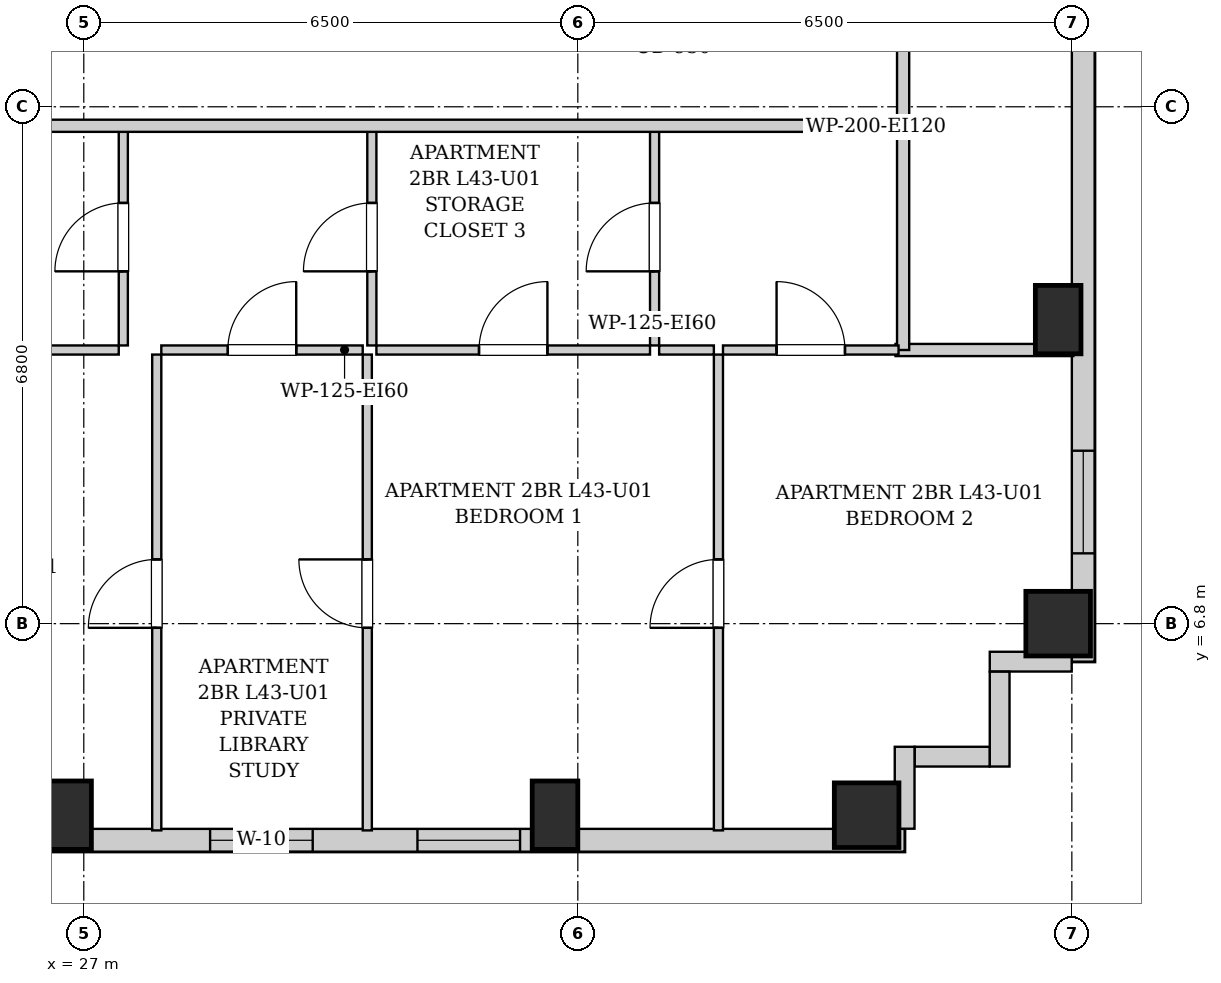
"""IFC4 building model, lengths in metres.
Left out: names, types, materials, properties, quantities, classifications, styles, units other than length and angle.
Written with IfcOpenShell. Run it as: python <this file> out.ifc"""

import sys

from ifc_helpers import new_model, si_unit, direction, frame, frame_2d, origin, origin_2d, place, context, subcontext, project, spatial, rectangle, extrude, element, fill, save


model = new_model("IFC4")
c1 = context("Model", 3, precision=1e-05, world=origin(), true_north=direction((0.0, 1.0)))
c2 = subcontext(c1, "Body", "Model", "MODEL_VIEW")
j1 = project(units=[si_unit("LENGTHUNIT", "METRE"), si_unit("PLANEANGLEUNIT", "RADIAN")], contexts=[c1])
p1 = place(None, origin())
s1 = spatial("IfcSite", under=j1, at=p1, CompositionType="ELEMENT")
p2 = place(p1, origin())
s2 = spatial("IfcBuilding", under=s1, at=p2, CompositionType="ELEMENT")
p3 = place(p2, frame((0.0, 0.0, 150.4)))
s3 = spatial("IfcBuildingStorey", under=s2, at=p3, CompositionType="ELEMENT", Elevation=150.4)
for number, where, z_axis, x_axis in (
    (1, (26.8, 4.28, 0.0), (0.0, 0.0, 1.0), (1.0, 0.0, 0.0)),
    (2, (33.2, 4.28, 0.0), (0.0, 0.0, 1.0), (1.0, 0.0, 0.0)),
):
    element("IfcColumn", number, at=place(p3, frame(where, z_axis=z_axis, x_axis=x_axis)), inside=s3, PredefinedType="COLUMN", context=c2, shape_type="SweptSolid", body=[
        extrude(rectangle(XDim=0.6, YDim=0.9, at=origin_2d()), origin(), (0.0, 0.0, 1.0), 3.25),
    ])
for number, where, z_axis, x_axis in (
    (3, (37.3, 4.28, 0.0), (0.0, 0.0, 1.0), (1.0, 0.0, 0.0)),
    (4, (39.82, 6.8, 0.0), (0.0, 0.0, 1.0), (1.0, 0.0, 0.0)),
):
    element("IfcColumn", number, at=place(p3, frame(where, z_axis=z_axis, x_axis=x_axis)), inside=s3, PredefinedType="COLUMN", context=c2, shape_type="SweptSolid", body=[
        extrude(rectangle(XDim=0.85, YDim=0.85, at=origin_2d()), origin(), (0.0, 0.0, 1.0), 3.25),
    ])
p4 = place(p3, frame((39.82, 10.8, 0.0), z_axis=(0.0, 0.0, 1.0), x_axis=(1.0, 0.0, 0.0)))
e5 = element("IfcColumn", 5, at=p4, inside=s3, PredefinedType="COLUMN", context=c2, shape_type="SweptSolid", body=[
    extrude(rectangle(XDim=0.6, YDim=0.9, at=origin_2d()), origin(), (0.0, 0.0, 1.0), 3.25),
])
p5 = place(p3, frame((40.15, 40.8, 0.0), z_axis=(0.0, 0.0, 1.0), x_axis=(0.0, -1.0, 0.0)))
e6 = element("IfcWall", 6, at=p5, inside=s3, PredefinedType="SOLIDWALL", context=c2, shape_type="SweptSolid", body=[
    extrude(rectangle(XDim=34.5, YDim=0.3, at=frame_2d((17.25, 0.0))), origin(), (0.0, 0.0, 1.0), 2.99),
])
p6 = place(p5, frame((31.725, 0.0, 0.55)))
e7 = element("IfcOpeningElement", 7, at=p6, cuts=e6, PredefinedType="OPENING", context=c2, shape_type="SweptSolid", body=[
    extrude(rectangle(XDim=1.35, YDim=1.2, at=frame_2d((0.675, 0.6))), frame((0.0, 0.16, 0.0), z_axis=(0.0, -1.0, 0.0), x_axis=(1.0, 0.0, 0.0)), (0.0, 0.0, 1.0), 0.32),
])
p7 = place(p5, frame((22.8, 0.0, 0.55)))
e8 = element("IfcOpeningElement", 8, at=p7, cuts=e6, PredefinedType="OPENING", context=c2, shape_type="SweptSolid", body=[
    extrude(rectangle(XDim=1.35, YDim=1.2, at=frame_2d((0.675, 0.6))), frame((0.0, 0.16, 0.0), z_axis=(0.0, -1.0, 0.0), x_axis=(1.0, 0.0, 0.0)), (0.0, 0.0, 1.0), 0.32),
])
p8 = place(p5, frame((13.425, 0.0, 0.55)))
e9 = element("IfcOpeningElement", 9, at=p8, cuts=e6, PredefinedType="OPENING", context=c2, shape_type="SweptSolid", body=[
    extrude(rectangle(XDim=1.35, YDim=1.2, at=frame_2d((0.675, 0.6))), frame((0.0, 0.16, 0.0), z_axis=(0.0, -1.0, 0.0), x_axis=(1.0, 0.0, 0.0)), (0.0, 0.0, 1.0), 0.32),
])
p9 = place(p3, frame((37.8, 3.95, 0.0), z_axis=(0.0, 0.0, 1.0), x_axis=(-1.0, 0.0, 0.0)))
e10 = element("IfcWall", 10, at=p9, inside=s3, PredefinedType="SOLIDWALL", context=c2, shape_type="SweptSolid", body=[
    extrude(rectangle(XDim=19.95, YDim=0.3, at=frame_2d((9.975, 0.0))), origin(), (0.0, 0.0, 1.0), 2.99),
])
p10 = place(p9, frame((16.555, 0.0, 0.55)))
e11 = element("IfcOpeningElement", 11, at=p10, cuts=e10, PredefinedType="OPENING", context=c2, shape_type="SweptSolid", body=[
    extrude(rectangle(XDim=1.35, YDim=1.2, at=frame_2d((0.675, 0.6))), frame((0.0, 0.16, 0.0), z_axis=(0.0, -1.0, 0.0), x_axis=(1.0, 0.0, 0.0)), (0.0, 0.0, 1.0), 0.32),
])
p11 = place(p9, frame((7.788, 0.0, 0.55)))
e12 = element("IfcOpeningElement", 12, at=p11, cuts=e10, PredefinedType="OPENING", context=c2, shape_type="SweptSolid", body=[
    extrude(rectangle(XDim=1.35, YDim=1.2, at=frame_2d((0.675, 0.6))), frame((0.0, 0.16, 0.0), z_axis=(0.0, -1.0, 0.0), x_axis=(1.0, 0.0, 0.0)), (0.0, 0.0, 1.0), 0.32),
])
p12 = place(p9, frame((5.06, 0.0, 0.55)))
e13 = element("IfcOpeningElement", 13, at=p12, cuts=e10, PredefinedType="OPENING", context=c2, shape_type="SweptSolid", body=[
    extrude(rectangle(XDim=1.35, YDim=1.2, at=frame_2d((0.675, 0.6))), frame((0.0, 0.16, 0.0), z_axis=(0.0, -1.0, 0.0), x_axis=(1.0, 0.0, 0.0)), (0.0, 0.0, 1.0), 0.32),
])
p13 = place(p3, frame((39.998, 6.3, 0.0), z_axis=(0.0, 0.0, 1.0), x_axis=(-1.0, 0.0, 0.0)))
e14 = element("IfcWall", 14, at=p13, inside=s3, PredefinedType="SOLIDWALL", context=c2, shape_type="SweptSolid", body=[
    extrude(rectangle(XDim=1.078, YDim=0.26, at=frame_2d((0.539, 0.0))), origin(), (0.0, 0.0, 1.0), 2.99),
])
p14 = place(p3, frame((39.05, 6.168, 0.0), z_axis=(0.0, 0.0, 1.0), x_axis=(0.0, -1.0, 0.0)))
e15 = element("IfcWall", 15, at=p14, inside=s3, PredefinedType="SOLIDWALL", context=c2, shape_type="SweptSolid", body=[
    extrude(rectangle(XDim=1.248, YDim=0.26, at=frame_2d((0.624, 0.0))), origin(), (0.0, 0.0, 1.0), 2.99),
])
p15 = place(p3, frame((38.918, 5.05, 0.0), z_axis=(0.0, 0.0, 1.0), x_axis=(-1.0, 0.0, 0.0)))
e16 = element("IfcWall", 16, at=p15, inside=s3, PredefinedType="SOLIDWALL", context=c2, shape_type="SweptSolid", body=[
    extrude(rectangle(XDim=0.986, YDim=0.26, at=frame_2d((0.493, 0.0))), origin(), (0.0, 0.0, 1.0), 2.99),
])
p16 = place(p3, frame((37.8, 5.18, 0.0), z_axis=(0.0, 0.0, 1.0), x_axis=(0.0, -1.0, 0.0)))
e17 = element("IfcWall", 17, at=p16, inside=s3, PredefinedType="SOLIDWALL", context=c2, shape_type="SweptSolid", body=[
    extrude(rectangle(XDim=1.078, YDim=0.26, at=frame_2d((0.539, 0.0))), origin(), (0.0, 0.0, 1.0), 2.99),
])
p17 = place(p3, frame((37.78, 13.35, 0.0), z_axis=(0.0, 0.0, 1.0), x_axis=(0.0, 1.0, 0.0)))
e18 = element("IfcWall", 18, at=p17, inside=s3, PredefinedType="PARTITIONING", context=c2, shape_type="SweptSolid", body=[
    extrude(rectangle(XDim=1.74, YDim=0.16, at=frame_2d((0.87, 0.0))), origin(), (0.0, 0.0, 1.0), 2.99),
])
p18 = place(p3, frame((37.68, 10.4, 0.0), z_axis=(0.0, 0.0, 1.0), x_axis=(1.0, 0.0, 0.0)))
e19 = element("IfcWall", 19, at=p18, inside=s3, PredefinedType="PARTITIONING", context=c2, shape_type="SweptSolid", body=[
    extrude(rectangle(XDim=2.34, YDim=0.16, at=frame_2d((1.17, 0.0))), origin(), (0.0, 0.0, 1.0), 2.99),
])
p19 = place(p3, frame((37.78, 10.4, 0.0), z_axis=(0.0, 0.0, 1.0), x_axis=(0.0, 1.0, 0.0)))
e20 = element("IfcWall", 20, at=p19, inside=s3, PredefinedType="PARTITIONING", context=c2, shape_type="SweptSolid", body=[
    extrude(rectangle(XDim=2.91, YDim=0.16, at=frame_2d((1.455, 0.0))), origin(), (0.0, 0.0, 1.0), 2.99),
])
p20 = place(p3, frame((27.52, 10.46, 0.0), z_axis=(0.0, 0.0, 1.0), x_axis=(0.0, 1.0, 0.0)))
e21 = element("IfcWall", 21, at=p20, inside=s3, PredefinedType="PARTITIONING", context=c2, shape_type="SweptSolid", body=[
    extrude(rectangle(XDim=2.85, YDim=0.12, at=frame_2d((1.425, 0.0))), origin(), (0.0, 0.0, 1.0), 2.99),
])
p21 = place(p20, frame((0.975, 0.0, 0.0)))
e22 = element("IfcOpeningElement", 22, at=p21, cuts=e21, PredefinedType="OPENING", context=c2, shape_type="SweptSolid", body=[
    extrude(rectangle(XDim=0.9, YDim=2.05, at=frame_2d((0.45, 1.025))), frame((0.0, 0.07, 0.0), z_axis=(0.0, -1.0, 0.0), x_axis=(1.0, 0.0, 0.0)), (0.0, 0.0, 1.0), 0.14),
])
p22 = place(p3, frame((23.86, 10.4, 0.0), z_axis=(0.0, 0.0, 1.0), x_axis=(1.0, 0.0, 0.0)))
e23 = element("IfcWall", 23, at=p22, inside=s3, PredefinedType="PARTITIONING", context=c2, shape_type="SweptSolid", body=[
    extrude(rectangle(XDim=3.6, YDim=0.12, at=frame_2d((1.8, 0.0))), origin(), (0.0, 0.0, 1.0), 2.99),
])
p23 = place(p22, frame((1.35, 0.0, 0.0)))
e24 = element("IfcOpeningElement", 24, at=p23, cuts=e23, PredefinedType="OPENING", context=c2, shape_type="SweptSolid", body=[
    extrude(rectangle(XDim=0.9, YDim=2.05, at=frame_2d((0.45, 1.025))), frame((0.0, 0.07, 0.0), z_axis=(0.0, -1.0, 0.0), x_axis=(1.0, 0.0, 0.0)), (0.0, 0.0, 1.0), 0.14),
])
p24 = place(p3, frame((30.79, 10.46, 0.0), z_axis=(0.0, 0.0, 1.0), x_axis=(0.0, 1.0, 0.0)))
e25 = element("IfcWall", 25, at=p24, inside=s3, PredefinedType="PARTITIONING", context=c2, shape_type="SweptSolid", body=[
    extrude(rectangle(XDim=2.85, YDim=0.12, at=frame_2d((1.425, 0.0))), origin(), (0.0, 0.0, 1.0), 2.99),
])
p25 = place(p24, frame((0.975, 0.0, 0.0)))
e26 = element("IfcOpeningElement", 26, at=p25, cuts=e25, PredefinedType="OPENING", context=c2, shape_type="SweptSolid", body=[
    extrude(rectangle(XDim=0.9, YDim=2.05, at=frame_2d((0.45, 1.025))), frame((0.0, 0.07, 0.0), z_axis=(0.0, -1.0, 0.0), x_axis=(1.0, 0.0, 0.0)), (0.0, 0.0, 1.0), 0.14),
])
p26 = place(p3, frame((28.02, 10.4, 0.0), z_axis=(0.0, 0.0, 1.0), x_axis=(1.0, 0.0, 0.0)))
e27 = element("IfcWall", 27, at=p26, inside=s3, PredefinedType="PARTITIONING", context=c2, shape_type="SweptSolid", body=[
    extrude(rectangle(XDim=2.65, YDim=0.12, at=frame_2d((1.325, 0.0))), origin(), (0.0, 0.0, 1.0), 2.99),
])
p27 = place(p26, frame((0.875, 0.0, 0.0)))
e28 = element("IfcOpeningElement", 28, at=p27, cuts=e27, PredefinedType="OPENING", context=c2, shape_type="SweptSolid", body=[
    extrude(rectangle(XDim=0.9, YDim=2.05, at=frame_2d((0.45, 1.025))), frame((0.0, 0.07, 0.0), z_axis=(0.0, -1.0, 0.0), x_axis=(1.0, 0.0, 0.0)), (0.0, 0.0, 1.0), 0.14),
])
p28 = place(p3, frame((34.51, 10.46, 0.0), z_axis=(0.0, 0.0, 1.0), x_axis=(0.0, 1.0, 0.0)))
e29 = element("IfcWall", 29, at=p28, inside=s3, PredefinedType="PARTITIONING", context=c2, shape_type="SweptSolid", body=[
    extrude(rectangle(XDim=2.85, YDim=0.12, at=frame_2d((1.425, 0.0))), origin(), (0.0, 0.0, 1.0), 2.99),
])
p29 = place(p28, frame((0.975, 0.0, 0.0)))
e30 = element("IfcOpeningElement", 30, at=p29, cuts=e29, PredefinedType="OPENING", context=c2, shape_type="SweptSolid", body=[
    extrude(rectangle(XDim=0.9, YDim=2.05, at=frame_2d((0.45, 1.025))), frame((0.0, 0.07, 0.0), z_axis=(0.0, -1.0, 0.0), x_axis=(1.0, 0.0, 0.0)), (0.0, 0.0, 1.0), 0.14),
])
p30 = place(p3, frame((30.85, 10.4, 0.0), z_axis=(0.0, 0.0, 1.0), x_axis=(1.0, 0.0, 0.0)))
e31 = element("IfcWall", 31, at=p30, inside=s3, PredefinedType="PARTITIONING", context=c2, shape_type="SweptSolid", body=[
    extrude(rectangle(XDim=3.6, YDim=0.12, at=frame_2d((1.8, 0.0))), origin(), (0.0, 0.0, 1.0), 2.99),
])
p31 = place(p30, frame((1.35, 0.0, 0.0)))
e32 = element("IfcOpeningElement", 32, at=p31, cuts=e31, PredefinedType="OPENING", context=c2, shape_type="SweptSolid", body=[
    extrude(rectangle(XDim=0.9, YDim=2.05, at=frame_2d((0.45, 1.025))), frame((0.0, 0.07, 0.0), z_axis=(0.0, -1.0, 0.0), x_axis=(1.0, 0.0, 0.0)), (0.0, 0.0, 1.0), 0.14),
])
p32 = place(p3, frame((34.57, 10.4, 0.0), z_axis=(0.0, 0.0, 1.0), x_axis=(1.0, 0.0, 0.0)))
e33 = element("IfcWall", 33, at=p32, inside=s3, PredefinedType="PARTITIONING", context=c2, shape_type="SweptSolid", body=[
    extrude(rectangle(XDim=0.72, YDim=0.12, at=frame_2d((0.36, 0.0))), origin(), (0.0, 0.0, 1.0), 2.99),
])
p33 = place(p3, frame((35.41, 10.4, 0.0), z_axis=(0.0, 0.0, 1.0), x_axis=(1.0, 0.0, 0.0)))
e34 = element("IfcWall", 34, at=p33, inside=s3, PredefinedType="PARTITIONING", context=c2, shape_type="SweptSolid", body=[
    extrude(rectangle(XDim=2.31, YDim=0.12, at=frame_2d((1.155, 0.0))), origin(), (0.0, 0.0, 1.0), 2.99),
])
p34 = place(p33, frame((0.705, 0.0, 0.0)))
e35 = element("IfcOpeningElement", 35, at=p34, cuts=e34, PredefinedType="OPENING", context=c2, shape_type="SweptSolid", body=[
    extrude(rectangle(XDim=0.9, YDim=2.05, at=frame_2d((0.45, 1.025))), frame((0.0, 0.07, 0.0), z_axis=(0.0, -1.0, 0.0), x_axis=(1.0, 0.0, 0.0)), (0.0, 0.0, 1.0), 0.14),
])
p35 = place(p3, frame((27.96, 4.08, 0.0), z_axis=(0.0, 0.0, 1.0), x_axis=(0.0, 1.0, 0.0)))
e36 = element("IfcWall", 36, at=p35, inside=s3, PredefinedType="PARTITIONING", context=c2, shape_type="SweptSolid", body=[
    extrude(rectangle(XDim=6.26, YDim=0.12, at=frame_2d((3.13, 0.0))), origin(), (0.0, 0.0, 1.0), 2.99),
])
p36 = place(p35, frame((2.665, 0.0, 0.0)))
e37 = element("IfcOpeningElement", 37, at=p36, cuts=e36, PredefinedType="OPENING", context=c2, shape_type="SweptSolid", body=[
    extrude(rectangle(XDim=0.9, YDim=2.05, at=frame_2d((0.45, 1.025))), frame((0.0, 0.07, 0.0), z_axis=(0.0, -1.0, 0.0), x_axis=(1.0, 0.0, 0.0)), (0.0, 0.0, 1.0), 0.14),
])
p37 = place(p3, frame((30.73, 4.08, 0.0), z_axis=(0.0, 0.0, 1.0), x_axis=(0.0, 1.0, 0.0)))
e38 = element("IfcWall", 38, at=p37, inside=s3, PredefinedType="PARTITIONING", context=c2, shape_type="SweptSolid", body=[
    extrude(rectangle(XDim=6.26, YDim=0.12, at=frame_2d((3.13, 0.0))), origin(), (0.0, 0.0, 1.0), 2.99),
])
p38 = place(p37, frame((2.665, 0.0, 0.0)))
e39 = element("IfcOpeningElement", 39, at=p38, cuts=e38, PredefinedType="OPENING", context=c2, shape_type="SweptSolid", body=[
    extrude(rectangle(XDim=0.9, YDim=2.05, at=frame_2d((0.45, 1.025))), frame((0.0, 0.07, 0.0), z_axis=(0.0, -1.0, 0.0), x_axis=(1.0, 0.0, 0.0)), (0.0, 0.0, 1.0), 0.14),
])
p39 = place(p3, frame((35.35, 4.08, 0.0), z_axis=(0.0, 0.0, 1.0), x_axis=(0.0, 1.0, 0.0)))
e40 = element("IfcWall", 40, at=p39, inside=s3, PredefinedType="PARTITIONING", context=c2, shape_type="SweptSolid", body=[
    extrude(rectangle(XDim=6.26, YDim=0.12, at=frame_2d((3.13, 0.0))), origin(), (0.0, 0.0, 1.0), 2.99),
])
p40 = place(p39, frame((2.665, 0.0, 0.0)))
e41 = element("IfcOpeningElement", 41, at=p40, cuts=e40, PredefinedType="OPENING", context=c2, shape_type="SweptSolid", body=[
    extrude(rectangle(XDim=0.9, YDim=2.05, at=frame_2d((0.45, 1.025))), frame((0.0, 0.07, 0.0), z_axis=(0.0, -1.0, 0.0), x_axis=(1.0, 0.0, 0.0)), (0.0, 0.0, 1.0), 0.14),
])
p41 = place(p3, frame((10.05, 13.35, 0.0), z_axis=(0.0, 0.0, 1.0), x_axis=(1.0, 0.0, 0.0)))
e42 = element("IfcWall", 42, at=p41, inside=s3, PredefinedType="PARTITIONING", context=c2, shape_type="SweptSolid", body=[
    extrude(rectangle(XDim=27.7, YDim=0.16, at=frame_2d((13.85, 0.0))), origin(), (0.0, 0.0, 1.0), 2.99),
])
p42 = place(p41, frame((4.165, 0.0, 0.0)))
e43 = element("IfcOpeningElement", 43, at=p42, cuts=e42, PredefinedType="OPENING", context=c2, shape_type="SweptSolid", body=[
    extrude(rectangle(XDim=0.95, YDim=2.1, at=frame_2d((0.475, 1.05))), frame((0.0, 0.09, 0.0), z_axis=(0.0, -1.0, 0.0), x_axis=(1.0, 0.0, 0.0)), (0.0, 0.0, 1.0), 0.18),
])
p43 = place(p21, origin())
e44 = element("IfcDoor", 44, at=p43, inside=s3, OperationType="SINGLE_SWING_LEFT", PredefinedType="DOOR", context=c2, shape_type="SweptSolid", body=[
    extrude(rectangle(XDim=0.9, YDim=2.05, at=frame_2d((0.45, 1.025))), frame((0.0, 0.025, 0.0), z_axis=(0.0, -1.0, 0.0), x_axis=(1.0, 0.0, 0.0)), (0.0, 0.0, 1.0), 0.05),
])
fill(e22, e44)
p44 = place(p25, origin())
e45 = element("IfcDoor", 45, at=p44, inside=s3, OperationType="SINGLE_SWING_LEFT", PredefinedType="DOOR", context=c2, shape_type="SweptSolid", body=[
    extrude(rectangle(XDim=0.9, YDim=2.05, at=frame_2d((0.45, 1.025))), frame((0.0, 0.025, 0.0), z_axis=(0.0, -1.0, 0.0), x_axis=(1.0, 0.0, 0.0)), (0.0, 0.0, 1.0), 0.05),
])
fill(e26, e45)
p45 = place(p27, origin())
e46 = element("IfcDoor", 46, at=p45, inside=s3, OperationType="SINGLE_SWING_RIGHT", PredefinedType="DOOR", context=c2, shape_type="SweptSolid", body=[
    extrude(rectangle(XDim=0.9, YDim=2.05, at=frame_2d((0.45, 1.025))), frame((0.0, 0.025, 0.0), z_axis=(0.0, -1.0, 0.0), x_axis=(1.0, 0.0, 0.0)), (0.0, 0.0, 1.0), 0.05),
])
fill(e28, e46)
p46 = place(p29, origin())
e47 = element("IfcDoor", 47, at=p46, inside=s3, OperationType="SINGLE_SWING_LEFT", PredefinedType="DOOR", context=c2, shape_type="SweptSolid", body=[
    extrude(rectangle(XDim=0.9, YDim=2.05, at=frame_2d((0.45, 1.025))), frame((0.0, 0.025, 0.0), z_axis=(0.0, -1.0, 0.0), x_axis=(1.0, 0.0, 0.0)), (0.0, 0.0, 1.0), 0.05),
])
fill(e30, e47)
p47 = place(p31, origin())
e48 = element("IfcDoor", 48, at=p47, inside=s3, OperationType="SINGLE_SWING_RIGHT", PredefinedType="DOOR", context=c2, shape_type="SweptSolid", body=[
    extrude(rectangle(XDim=0.9, YDim=2.05, at=frame_2d((0.45, 1.025))), frame((0.0, 0.025, 0.0), z_axis=(0.0, -1.0, 0.0), x_axis=(1.0, 0.0, 0.0)), (0.0, 0.0, 1.0), 0.05),
])
fill(e32, e48)
p48 = place(p34, origin())
e49 = element("IfcDoor", 49, at=p48, inside=s3, OperationType="SINGLE_SWING_LEFT", PredefinedType="DOOR", context=c2, shape_type="SweptSolid", body=[
    extrude(rectangle(XDim=0.9, YDim=2.05, at=frame_2d((0.45, 1.025))), frame((0.0, 0.025, 0.0), z_axis=(0.0, -1.0, 0.0), x_axis=(1.0, 0.0, 0.0)), (0.0, 0.0, 1.0), 0.05),
])
fill(e35, e49)
p49 = place(p36, origin())
e50 = element("IfcDoor", 50, at=p49, inside=s3, OperationType="SINGLE_SWING_LEFT", PredefinedType="DOOR", context=c2, shape_type="SweptSolid", body=[
    extrude(rectangle(XDim=0.9, YDim=2.05, at=frame_2d((0.45, 1.025))), frame((0.0, 0.025, 0.0), z_axis=(0.0, -1.0, 0.0), x_axis=(1.0, 0.0, 0.0)), (0.0, 0.0, 1.0), 0.05),
])
fill(e37, e50)
p50 = place(p38, origin())
e51 = element("IfcDoor", 51, at=p50, inside=s3, OperationType="SINGLE_SWING_RIGHT", PredefinedType="DOOR", context=c2, shape_type="SweptSolid", body=[
    extrude(rectangle(XDim=0.9, YDim=2.05, at=frame_2d((0.45, 1.025))), frame((0.0, 0.025, 0.0), z_axis=(0.0, -1.0, 0.0), x_axis=(1.0, 0.0, 0.0)), (0.0, 0.0, 1.0), 0.05),
])
fill(e39, e51)
p51 = place(p40, origin())
e52 = element("IfcDoor", 52, at=p51, inside=s3, OperationType="SINGLE_SWING_LEFT", PredefinedType="DOOR", context=c2, shape_type="SweptSolid", body=[
    extrude(rectangle(XDim=0.9, YDim=2.05, at=frame_2d((0.45, 1.025))), frame((0.0, 0.025, 0.0), z_axis=(0.0, -1.0, 0.0), x_axis=(1.0, 0.0, 0.0)), (0.0, 0.0, 1.0), 0.05),
])
fill(e41, e52)
p52 = place(p11, origin())
e53 = element("IfcWindow", 53, at=p52, inside=s3, PartitioningType="SINGLE_PANEL", PredefinedType="WINDOW", context=c2, shape_type="SweptSolid", body=[
    extrude(rectangle(XDim=1.35, YDim=1.2, at=frame_2d((0.675, 0.6))), frame((0.0, 0.03, 0.0), z_axis=(0.0, -1.0, 0.0), x_axis=(1.0, 0.0, 0.0)), (0.0, 0.0, 1.0), 0.06),
])
fill(e12, e53)
p53 = place(p12, origin())
e54 = element("IfcWindow", 54, at=p53, inside=s3, PartitioningType="SINGLE_PANEL", PredefinedType="WINDOW", context=c2, shape_type="SweptSolid", body=[
    extrude(rectangle(XDim=1.35, YDim=1.2, at=frame_2d((0.675, 0.6))), frame((0.0, 0.03, 0.0), z_axis=(0.0, -1.0, 0.0), x_axis=(1.0, 0.0, 0.0)), (0.0, 0.0, 1.0), 0.06),
])
fill(e13, e54)
p54 = place(p6, origin())
e55 = element("IfcWindow", 55, at=p54, inside=s3, PartitioningType="SINGLE_PANEL", PredefinedType="WINDOW", context=c2, shape_type="SweptSolid", body=[
    extrude(rectangle(XDim=1.35, YDim=1.2, at=frame_2d((0.675, 0.6))), frame((0.0, 0.03, 0.0), z_axis=(0.0, -1.0, 0.0), x_axis=(1.0, 0.0, 0.0)), (0.0, 0.0, 1.0), 0.06),
])
fill(e7, e55)
save(model, sys.argv[1])
